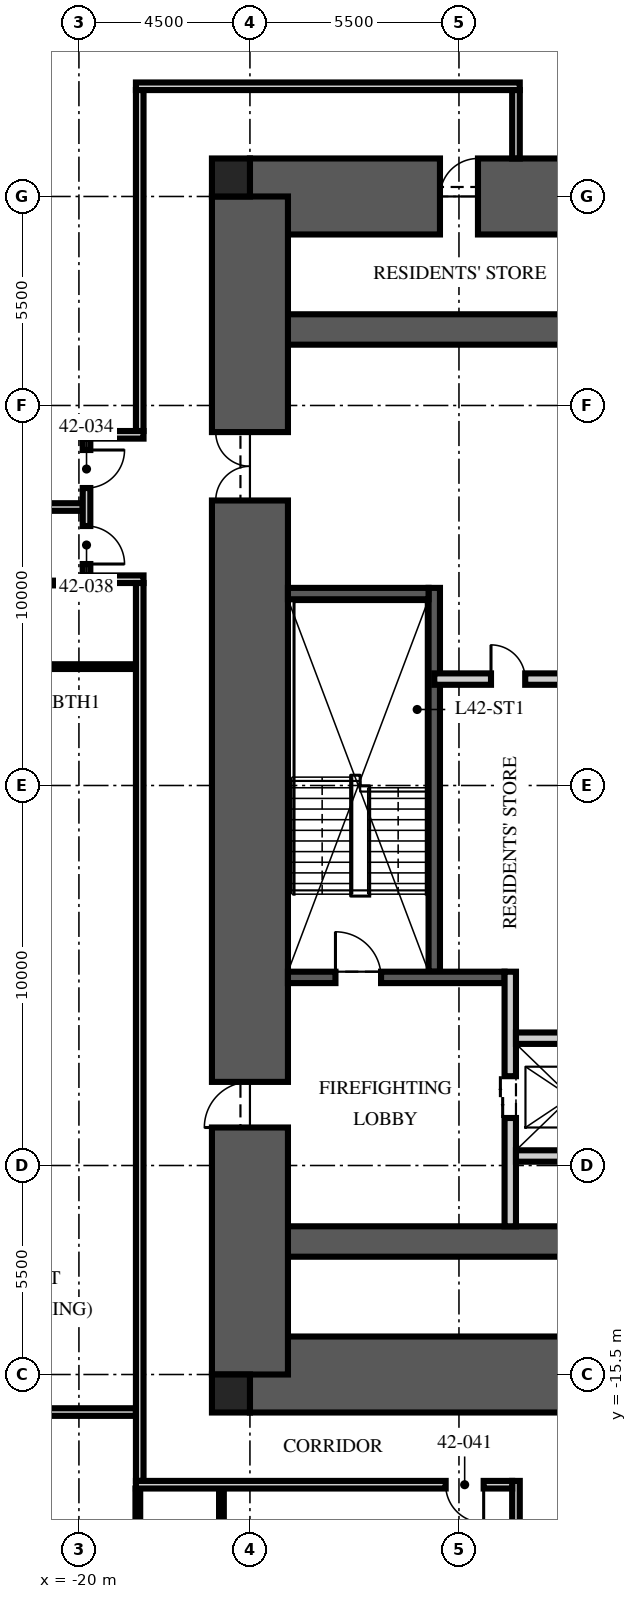
"""IFC4 building model, lengths in metres.
Left out: names, types, materials, properties, quantities, classifications, styles, units other than length and angle.
Written with IfcOpenShell. Run it as: python <this file> out.ifc"""

import sys

from ifc_helpers import new_model, si_unit, direction, frame, frame_2d, origin, origin_2d, place, context, subcontext, project, spatial, rectangle, extrude, element, fill, save


model = new_model("IFC4")
c1 = context("Model", 3, precision=1e-05, world=origin(), true_north=direction((0.0, 1.0)))
c2 = subcontext(c1, "Body", "Model", "MODEL_VIEW")
j1 = project(units=[si_unit("LENGTHUNIT", "METRE"), si_unit("PLANEANGLEUNIT", "RADIAN")], contexts=[c1])
p1 = place(None, origin())
s1 = spatial("IfcSite", under=j1, at=p1, CompositionType="ELEMENT")
p2 = place(p1, origin())
s2 = spatial("IfcBuilding", under=s1, at=p2, CompositionType="ELEMENT")
p3 = place(p2, frame((0.0, 0.0, 167.25)))
s3 = spatial("IfcBuildingStorey", under=s2, at=p3, CompositionType="ELEMENT", Elevation=167.25)
p4 = place(p3, frame((-15.5, 15.5, -0.25), z_axis=(0.0, 0.0, 1.0), x_axis=(1.0, 0.0, 0.0)))
e1 = element("IfcWall", 1, at=p4, inside=s3, PredefinedType="SHEAR", context=c2, shape_type="SweptSolid", body=[
    extrude(rectangle(XDim=31.0, YDim=2.0, at=frame_2d((15.5, 0.0))), origin(), (0.0, 0.0, 1.0), 3.75),
])
p5 = place(p4, frame((5.0, 0.0, 0.25)))
e2 = element("IfcOpeningElement", 2, at=p5, cuts=e1, PredefinedType="OPENING", context=c2, shape_type="SweptSolid", body=[
    extrude(rectangle(XDim=1.0, YDim=2.1, at=frame_2d((0.5, 1.05))), frame((0.0, 1.01, 0.0), z_axis=(0.0, -1.0, 0.0), x_axis=(1.0, 0.0, 0.0)), (0.0, 0.0, 1.0), 2.02),
])
p6 = place(p3, frame((-15.5, -15.5, -0.25), z_axis=(0.0, 0.0, 1.0), x_axis=(1.0, 0.0, 0.0)))
e3 = element("IfcWall", 3, at=p6, inside=s3, PredefinedType="SHEAR", context=c2, shape_type="SweptSolid", body=[
    extrude(rectangle(XDim=31.0, YDim=2.0, at=frame_2d((15.5, 0.0))), origin(), (0.0, 0.0, 1.0), 3.75),
])
p7 = place(p6, frame((10.4, 0.0, 0.25)))
e4 = element("IfcOpeningElement", 4, at=p7, cuts=e3, PredefinedType="OPENING", context=c2, shape_type="SweptSolid", body=[
    extrude(rectangle(XDim=1.1, YDim=2.1, at=frame_2d((0.55, 1.05))), frame((0.0, 1.01, 0.0), z_axis=(0.0, -1.0, 0.0), x_axis=(1.0, 0.0, 0.0)), (0.0, 0.0, 1.0), 2.02),
])
p8 = place(p6, frame((13.5, 0.0, 0.25)))
e5 = element("IfcOpeningElement", 5, at=p8, cuts=e3, PredefinedType="OPENING", context=c2, shape_type="SweptSolid", body=[
    extrude(rectangle(XDim=1.1, YDim=2.1, at=frame_2d((0.55, 1.05))), frame((0.0, 1.01, 0.0), z_axis=(0.0, -1.0, 0.0), x_axis=(1.0, 0.0, 0.0)), (0.0, 0.0, 1.0), 2.02),
])
p9 = place(p6, frame((16.6, 0.0, 0.25)))
e6 = element("IfcOpeningElement", 6, at=p9, cuts=e3, PredefinedType="OPENING", context=c2, shape_type="SweptSolid", body=[
    extrude(rectangle(XDim=1.1, YDim=2.1, at=frame_2d((0.55, 1.05))), frame((0.0, 1.01, 0.0), z_axis=(0.0, -1.0, 0.0), x_axis=(1.0, 0.0, 0.0)), (0.0, 0.0, 1.0), 2.02),
])
for number, where, z_axis, x_axis in (
    (7, (-15.5, 12.0, -0.25), (0.0, 0.0, 1.0), (1.0, 0.0, 0.0)),
    (8, (-15.5, -12.0, -0.25), (0.0, 0.0, 1.0), (1.0, 0.0, 0.0)),
):
    element("IfcWall", number, at=place(p3, frame(where, z_axis=z_axis, x_axis=x_axis)), inside=s3, PredefinedType="SHEAR", context=c2, shape_type="SweptSolid", body=[
        extrude(rectangle(XDim=31.0, YDim=0.8, at=frame_2d((15.5, 0.0))), origin(), (0.0, 0.0, 1.0), 3.75),
    ])
p10 = place(p3, frame((-15.5, -15.5, -0.25), z_axis=(0.0, 0.0, 1.0), x_axis=(0.0, 1.0, 0.0)))
e9 = element("IfcWall", 9, at=p10, inside=s3, PredefinedType="SHEAR", context=c2, shape_type="SweptSolid", body=[
    extrude(rectangle(XDim=31.0, YDim=2.0, at=frame_2d((15.5, 0.0))), origin(), (0.0, 0.0, 1.0), 3.75),
])
p11 = place(p10, frame((6.5, 0.0, 0.25)))
e10 = element("IfcOpeningElement", 10, at=p11, cuts=e9, PredefinedType="OPENING", context=c2, shape_type="SweptSolid", body=[
    extrude(rectangle(XDim=1.2, YDim=2.1, at=frame_2d((0.6, 1.05))), frame((0.0, 1.01, 0.0), z_axis=(0.0, -1.0, 0.0), x_axis=(1.0, 0.0, 0.0)), (0.0, 0.0, 1.0), 2.02),
])
p12 = place(p10, frame((23.0, 0.0, 0.25)))
e11 = element("IfcOpeningElement", 11, at=p12, cuts=e9, PredefinedType="OPENING", context=c2, shape_type="SweptSolid", body=[
    extrude(rectangle(XDim=1.8, YDim=2.1, at=frame_2d((0.9, 1.05))), frame((0.0, 1.01, 0.0), z_axis=(0.0, -1.0, 0.0), x_axis=(1.0, 0.0, 0.0)), (0.0, 0.0, 1.0), 2.02),
])
for number, where, z_axis, x_axis in (
    (12, (-16.0, 16.0, -0.25), (0.0, 0.0, 1.0), (1.0, 0.0, 0.0)),
    (13, (-16.0, -16.0, -0.25), (0.0, 0.0, 1.0), (1.0, 0.0, 0.0)),
):
    element("IfcColumn", number, at=place(p3, frame(where, z_axis=z_axis, x_axis=x_axis)), inside=s3, PredefinedType="COLUMN", context=c2, shape_type="SweptSolid", body=[
        extrude(rectangle(XDim=1.0, YDim=1.0, at=origin_2d()), origin(), (0.0, 0.0, 1.0), 3.75),
    ])
p13 = place(p3, frame((-10.65, -4.9, 0.0), z_axis=(0.0, 0.0, 1.0), x_axis=(0.0, 1.0, 0.0)))
e14 = element("IfcWall", 14, at=p13, inside=s3, PredefinedType="SOLIDWALL", context=c2, shape_type="SweptSolid", body=[
    extrude(rectangle(XDim=10.1, YDim=0.3, at=frame_2d((5.05, 0.0))), origin(), (0.0, 0.0, 1.0), 3.5),
])
p14 = place(p3, frame((-14.5, -5.05, 0.0), z_axis=(0.0, 0.0, 1.0), x_axis=(1.0, 0.0, 0.0)))
e15 = element("IfcWall", 15, at=p14, inside=s3, PredefinedType="SOLIDWALL", context=c2, shape_type="SweptSolid", body=[
    extrude(rectangle(XDim=5.7, YDim=0.3, at=frame_2d((2.85, 0.0))), origin(), (0.0, 0.0, 1.0), 3.5),
])
p15 = place(p14, frame((1.25, 0.0, 0.0)))
e16 = element("IfcOpeningElement", 16, at=p15, cuts=e15, PredefinedType="OPENING", context=c2, shape_type="SweptSolid", body=[
    extrude(rectangle(XDim=1.2, YDim=2.1, at=frame_2d((0.6, 1.05))), frame((0.0, 0.16, 0.0), z_axis=(0.0, -1.0, 0.0), x_axis=(1.0, 0.0, 0.0)), (0.0, 0.0, 1.0), 0.32),
])
p16 = place(p3, frame((-14.5, 5.05, 0.0), z_axis=(0.0, 0.0, 1.0), x_axis=(1.0, 0.0, 0.0)))
e17 = element("IfcWall", 17, at=p16, inside=s3, PredefinedType="SOLIDWALL", context=c2, shape_type="SweptSolid", body=[
    extrude(rectangle(XDim=3.7, YDim=0.3, at=frame_2d((1.85, 0.0))), origin(), (0.0, 0.0, 1.0), 3.5),
])
p17 = place(p3, frame((-8.65, -11.6, 0.0), z_axis=(0.0, 0.0, 1.0), x_axis=(0.0, 1.0, 0.0)))
e18 = element("IfcWall", 18, at=p17, inside=s3, PredefinedType="PARTITIONING", context=c2, shape_type="SweptSolid", body=[
    extrude(rectangle(XDim=6.7, YDim=0.3, at=frame_2d((3.35, 0.0))), origin(), (0.0, 0.0, 1.0), 3.5),
])
p18 = place(p17, frame((2.85, 0.0, 0.0)))
e19 = element("IfcOpeningElement", 19, at=p18, cuts=e18, PredefinedType="OPENING", context=c2, shape_type="SweptSolid", body=[
    extrude(rectangle(XDim=1.1, YDim=2.1, at=frame_2d((0.55, 1.05))), frame((0.0, 0.16, 0.0), z_axis=(0.0, -1.0, 0.0), x_axis=(1.0, 0.0, 0.0)), (0.0, 0.0, 1.0), 0.32),
])
p19 = place(p3, frame((-8.5, -6.65, 0.0), z_axis=(0.0, 0.0, 1.0), x_axis=(1.0, 0.0, 0.0)))
e20 = element("IfcWall", 20, at=p19, inside=s3, PredefinedType="PARTITIONING", context=c2, shape_type="SweptSolid", body=[
    extrude(rectangle(XDim=17.0, YDim=0.3, at=frame_2d((8.5, 0.0))), origin(), (0.0, 0.0, 1.0), 3.5),
])
p20 = place(p19, frame((7.8, 0.0, 0.0)))
e21 = element("IfcOpeningElement", 21, at=p20, cuts=e20, PredefinedType="OPENING", context=c2, shape_type="SweptSolid", body=[
    extrude(rectangle(XDim=1.3, YDim=2.4, at=frame_2d((0.65, 1.2))), frame((0.0, 0.16, 0.0), z_axis=(0.0, -1.0, 0.0), x_axis=(1.0, 0.0, 0.0)), (0.0, 0.0, 1.0), 0.32),
])
p21 = place(p19, frame((5.65, 0.0, 0.0)))
e22 = element("IfcOpeningElement", 22, at=p21, cuts=e20, PredefinedType="OPENING", context=c2, shape_type="SweptSolid", body=[
    extrude(rectangle(XDim=0.9, YDim=2.1, at=frame_2d((0.45, 1.05))), frame((0.0, 0.16, 0.0), z_axis=(0.0, -1.0, 0.0), x_axis=(1.0, 0.0, 0.0)), (0.0, 0.0, 1.0), 0.32),
])
p22 = place(p19, frame((10.4, 0.0, 0.0)))
e23 = element("IfcOpeningElement", 23, at=p22, cuts=e20, PredefinedType="OPENING", context=c2, shape_type="SweptSolid", body=[
    extrude(rectangle(XDim=0.9, YDim=2.1, at=frame_2d((0.45, 1.05))), frame((0.0, 0.16, 0.0), z_axis=(0.0, -1.0, 0.0), x_axis=(1.0, 0.0, 0.0)), (0.0, 0.0, 1.0), 0.32),
])
p23 = place(p3, frame((-8.5, -9.75, 0.0), z_axis=(0.0, 0.0, 1.0), x_axis=(1.0, 0.0, 0.0)))
e24 = element("IfcWall", 24, at=p23, inside=s3, PredefinedType="PARTITIONING", context=c2, shape_type="SweptSolid", body=[
    extrude(rectangle(XDim=2.9, YDim=0.3, at=frame_2d((1.45, 0.0))), origin(), (0.0, 0.0, 1.0), 3.5),
])
p24 = place(p3, frame((-10.65, 2.8, 0.0), z_axis=(0.0, 0.0, 1.0), x_axis=(1.0, 0.0, 0.0)))
e25 = element("IfcWall", 25, at=p24, inside=s3, PredefinedType="PARTITIONING", context=c2, shape_type="SweptSolid", body=[
    extrude(rectangle(XDim=21.3, YDim=0.3, at=frame_2d((10.65, 0.0))), origin(), (0.0, 0.0, 1.0), 3.5),
])
p25 = place(p24, frame((10.05, 0.0, 0.0)))
e26 = element("IfcOpeningElement", 26, at=p25, cuts=e25, PredefinedType="OPENING", context=c2, shape_type="SweptSolid", body=[
    extrude(rectangle(XDim=1.2, YDim=2.1, at=frame_2d((0.6, 1.05))), frame((0.0, 0.16, 0.0), z_axis=(0.0, -1.0, 0.0), x_axis=(1.0, 0.0, 0.0)), (0.0, 0.0, 1.0), 0.32),
])
p26 = place(p24, frame((1.493, 0.0, 0.0)))
e27 = element("IfcOpeningElement", 27, at=p26, cuts=e25, PredefinedType="OPENING", context=c2, shape_type="SweptSolid", body=[
    extrude(rectangle(XDim=0.9, YDim=2.1, at=frame_2d((0.45, 1.05))), frame((0.0, 0.16, 0.0), z_axis=(0.0, -1.0, 0.0), x_axis=(1.0, 0.0, 0.0)), (0.0, 0.0, 1.0), 0.32),
])
p27 = place(p24, frame((18.836, 0.0, 0.0)))
e28 = element("IfcOpeningElement", 28, at=p27, cuts=e25, PredefinedType="OPENING", context=c2, shape_type="SweptSolid", body=[
    extrude(rectangle(XDim=0.9, YDim=2.1, at=frame_2d((0.45, 1.05))), frame((0.0, 0.16, 0.0), z_axis=(0.0, -1.0, 0.0), x_axis=(1.0, 0.0, 0.0)), (0.0, 0.0, 1.0), 0.32),
])
p28 = place(p3, frame((-18.5, 18.4, 0.0), z_axis=(0.0, 0.0, 1.0), x_axis=(1.0, 0.0, 0.0)))
e29 = element("IfcWall", 29, at=p28, inside=s3, PredefinedType="PARTITIONING", context=c2, shape_type="SweptSolid", body=[
    extrude(rectangle(XDim=10.1, YDim=0.2, at=frame_2d((5.05, 0.0))), origin(), (0.0, 0.0, 1.0), 2.3),
])
p29 = place(p3, frame((-8.5, 18.3, 0.0), z_axis=(0.0, 0.0, 1.0), x_axis=(0.0, -1.0, 0.0)))
e30 = element("IfcWall", 30, at=p29, inside=s3, PredefinedType="PARTITIONING", context=c2, shape_type="SweptSolid", body=[
    extrude(rectangle(XDim=1.8, YDim=0.2, at=frame_2d((0.9, 0.0))), origin(), (0.0, 0.0, 1.0), 3.5),
])
p30 = place(p3, frame((-19.9, 7.328, 0.0), z_axis=(0.0, 0.0, 1.0), x_axis=(-1.0, 0.0, 0.0)))
e31 = element("IfcWall", 31, at=p30, inside=s3, PredefinedType="PARTITIONING", context=c2, shape_type="SweptSolid", body=[
    extrude(rectangle(XDim=8.5, YDim=0.2, at=frame_2d((4.25, 0.0))), origin(), (0.0, 0.0, 1.0), 2.81),
])
p31 = place(p3, frame((-18.5, -16.488, 0.0), z_axis=(0.0, 0.0, 1.0), x_axis=(-1.0, 0.0, 0.0)))
e32 = element("IfcWall", 32, at=p31, inside=s3, PredefinedType="PARTITIONING", context=c2, shape_type="SweptSolid", body=[
    extrude(rectangle(XDim=9.9, YDim=0.2, at=frame_2d((4.95, 0.0))), origin(), (0.0, 0.0, 1.0), 2.81),
])
p32 = place(p3, frame((-19.97, 5.328, 0.0), z_axis=(0.0, 0.0, 1.0), x_axis=(-1.0, 0.0, 0.0)))
e33 = element("IfcWall", 33, at=p32, inside=s3, PredefinedType="PARTITIONING", context=c2, shape_type="SweptSolid", body=[
    extrude(rectangle(XDim=2.73, YDim=0.125, at=frame_2d((1.365, 0.0))), origin(), (0.0, 0.0, 1.0), 3.5),
])
p33 = place(p3, frame((-18.5, 3.128, 0.0), z_axis=(0.0, 0.0, 1.0), x_axis=(-1.0, 0.0, 0.0)))
e34 = element("IfcWall", 34, at=p33, inside=s3, PredefinedType="PARTITIONING", context=c2, shape_type="SweptSolid", body=[
    extrude(rectangle(XDim=4.2, YDim=0.125, at=frame_2d((2.1, 0.0))), origin(), (0.0, 0.0, 1.0), 3.5),
])
p34 = place(p3, frame((-18.45, -18.5, 0.0), z_axis=(0.0, 0.0, 1.0), x_axis=(0.0, -1.0, 0.0)))
e35 = element("IfcWall", 35, at=p34, inside=s3, PredefinedType="PARTITIONING", context=c2, shape_type="SweptSolid", body=[
    extrude(rectangle(XDim=4.2, YDim=0.125, at=frame_2d((2.1, 0.0))), origin(), (0.0, 0.0, 1.0), 2.3),
])
p35 = place(p3, frame((-16.25, -18.5, 0.0), z_axis=(0.0, 0.0, 1.0), x_axis=(0.0, -1.0, 0.0)))
e36 = element("IfcWall", 36, at=p35, inside=s3, PredefinedType="PARTITIONING", context=c2, shape_type="SweptSolid", body=[
    extrude(rectangle(XDim=4.2, YDim=0.125, at=frame_2d((2.1, 0.0))), origin(), (0.0, 0.0, 1.0), 3.5),
])
p36 = place(p3, frame((-18.4, 18.3, 0.0), z_axis=(0.0, 0.0, 1.0), x_axis=(0.0, -1.0, 0.0)))
e37 = element("IfcWall", 37, at=p36, inside=s3, PredefinedType="PARTITIONING", context=c2, shape_type="SweptSolid", body=[
    extrude(rectangle(XDim=8.972, YDim=0.2, at=frame_2d((4.486, 0.0))), origin(), (0.0, 0.0, 1.0), 2.3),
])
p37 = place(p3, frame((-18.3, 9.228, 0.0), z_axis=(0.0, 0.0, 1.0), x_axis=(-1.0, 0.0, 0.0)))
e38 = element("IfcWall", 38, at=p37, inside=s3, PredefinedType="PARTITIONING", context=c2, shape_type="SweptSolid", body=[
    extrude(rectangle(XDim=1.6, YDim=0.2, at=frame_2d((0.8, 0.0))), origin(), (0.0, 0.0, 1.0), 2.7),
])
p38 = place(p3, frame((-18.3, 5.428, 0.0), z_axis=(0.0, 0.0, 1.0), x_axis=(-1.0, 0.0, 0.0)))
e39 = element("IfcWall", 39, at=p38, inside=s3, PredefinedType="PARTITIONING", context=c2, shape_type="SweptSolid", body=[
    extrude(rectangle(XDim=1.6, YDim=0.2, at=frame_2d((0.8, 0.0))), origin(), (0.0, 0.0, 1.0), 3.5),
])
p39 = place(p3, frame((-19.8, 9.128, 0.0), z_axis=(0.0, 0.0, 1.0), x_axis=(0.0, -1.0, 0.0)))
e40 = element("IfcWall", 40, at=p39, inside=s3, PredefinedType="PARTITIONING", context=c2, shape_type="SweptSolid", body=[
    extrude(rectangle(XDim=3.6, YDim=0.2, at=frame_2d((1.8, 0.0))), origin(), (0.0, 0.0, 1.0), 2.7),
])
p40 = place(p39, frame((0.3, 0.0, 0.0)))
e41 = element("IfcOpeningElement", 41, at=p40, cuts=e40, PredefinedType="OPENING", context=c2, shape_type="SweptSolid", body=[
    extrude(rectangle(XDim=1.0, YDim=2.2, at=frame_2d((0.5, 1.1))), frame((0.0, 0.11, 0.0), z_axis=(0.0, -1.0, 0.0), x_axis=(1.0, 0.0, 0.0)), (0.0, 0.0, 1.0), 0.22),
])
p41 = place(p39, frame((2.3, 0.0, 0.0)))
e42 = element("IfcOpeningElement", 42, at=p41, cuts=e40, PredefinedType="OPENING", context=c2, shape_type="SweptSolid", body=[
    extrude(rectangle(XDim=1.0, YDim=2.2, at=frame_2d((0.5, 1.1))), frame((0.0, 0.11, 0.0), z_axis=(0.0, -1.0, 0.0), x_axis=(1.0, 0.0, 0.0)), (0.0, 0.0, 1.0), 0.22),
])
p42 = place(p3, frame((-18.4, 5.328, 0.0), z_axis=(0.0, 0.0, 1.0), x_axis=(0.0, -1.0, 0.0)))
e43 = element("IfcWall", 43, at=p42, inside=s3, PredefinedType="PARTITIONING", context=c2, shape_type="SweptSolid", body=[
    extrude(rectangle(XDim=23.628, YDim=0.2, at=frame_2d((11.814, 0.0))), origin(), (0.0, 0.0, 1.0), 2.3),
])
p43 = place(p3, frame((-8.5, -18.3, 0.0), z_axis=(0.0, 0.0, 1.0), x_axis=(0.0, -1.0, 0.0)))
e44 = element("IfcWall", 44, at=p43, inside=s3, PredefinedType="PARTITIONING", context=c2, shape_type="SweptSolid", body=[
    extrude(rectangle(XDim=3.0, YDim=0.2, at=frame_2d((1.5, 0.0))), origin(), (0.0, 0.0, 1.0), 3.5),
])
p44 = place(p3, frame((-8.6, -18.4, 0.0), z_axis=(0.0, 0.0, 1.0), x_axis=(-1.0, 0.0, 0.0)))
e45 = element("IfcWall", 45, at=p44, inside=s3, PredefinedType="PARTITIONING", context=c2, shape_type="SweptSolid", body=[
    extrude(rectangle(XDim=9.9, YDim=0.2, at=frame_2d((4.95, 0.0))), origin(), (0.0, 0.0, 1.0), 2.3),
])
p45 = place(p44, frame((0.75, 0.0, 0.0)))
e46 = element("IfcOpeningElement", 46, at=p45, cuts=e45, PredefinedType="OPENING", context=c2, shape_type="SweptSolid", body=[
    extrude(rectangle(XDim=1.0, YDim=2.2, at=frame_2d((0.5, 1.1))), frame((0.0, 0.11, 0.0), z_axis=(0.0, -1.0, 0.0), x_axis=(1.0, 0.0, 0.0)), (0.0, 0.0, 1.0), 0.22),
])
p46 = place(p15, origin())
e47 = element("IfcDoor", 47, at=p46, inside=s3, OperationType="SINGLE_SWING_LEFT", PredefinedType="DOOR", context=c2, shape_type="SweptSolid", body=[
    extrude(rectangle(XDim=1.2, YDim=2.1, at=frame_2d((0.6, 1.05))), frame((0.0, 0.025, 0.0), z_axis=(0.0, -1.0, 0.0), x_axis=(1.0, 0.0, 0.0)), (0.0, 0.0, 1.0), 0.05),
])
fill(e16, e47)
p47 = place(p11, origin())
e48 = element("IfcDoor", 48, at=p47, inside=s3, OperationType="SINGLE_SWING_LEFT", PredefinedType="DOOR", context=c2, shape_type="SweptSolid", body=[
    extrude(rectangle(XDim=1.2, YDim=2.1, at=frame_2d((0.6, 1.05))), frame((0.0, 0.025, 0.0), z_axis=(0.0, -1.0, 0.0), x_axis=(1.0, 0.0, 0.0)), (0.0, 0.0, 1.0), 0.05),
])
fill(e10, e48)
p48 = place(p12, origin())
e49 = element("IfcDoor", 49, at=p48, inside=s3, OperationType="DOUBLE_DOOR_SINGLE_SWING", PredefinedType="DOOR", context=c2, shape_type="SweptSolid", body=[
    extrude(rectangle(XDim=1.8, YDim=2.1, at=frame_2d((0.9, 1.05))), frame((0.0, 0.025, 0.0), z_axis=(0.0, -1.0, 0.0), x_axis=(1.0, 0.0, 0.0)), (0.0, 0.0, 1.0), 0.05),
])
fill(e11, e49)
p49 = place(p18, origin())
e50 = element("IfcDoor", 50, at=p49, inside=s3, OperationType="DOUBLE_DOOR_SLIDING", PredefinedType="DOOR", context=c2, shape_type="SweptSolid", body=[
    extrude(rectangle(XDim=1.1, YDim=2.1, at=frame_2d((0.55, 1.05))), frame((0.0, 0.025, 0.0), z_axis=(0.0, -1.0, 0.0), x_axis=(1.0, 0.0, 0.0)), (0.0, 0.0, 1.0), 0.05),
])
fill(e19, e50)
p50 = place(p26, origin())
e51 = element("IfcDoor", 51, at=p50, inside=s3, OperationType="SINGLE_SWING_LEFT", PredefinedType="DOOR", context=c2, shape_type="SweptSolid", body=[
    extrude(rectangle(XDim=0.9, YDim=2.1, at=frame_2d((0.45, 1.05))), frame((0.0, 0.025, 0.0), z_axis=(0.0, -1.0, 0.0), x_axis=(1.0, 0.0, 0.0)), (0.0, 0.0, 1.0), 0.05),
])
fill(e27, e51)
p51 = place(p5, origin())
e52 = element("IfcDoor", 52, at=p51, inside=s3, OperationType="SINGLE_SWING_RIGHT", PredefinedType="DOOR", context=c2, shape_type="SweptSolid", body=[
    extrude(rectangle(XDim=1.0, YDim=2.1, at=frame_2d((0.5, 1.05))), frame((0.0, 0.025, 0.0), z_axis=(0.0, -1.0, 0.0), x_axis=(1.0, 0.0, 0.0)), (0.0, 0.0, 1.0), 0.05),
])
fill(e2, e52)
p52 = place(p40, origin())
e53 = element("IfcDoor", 53, at=p52, inside=s3, OperationType="SINGLE_SWING_LEFT", PredefinedType="DOOR", context=c2, shape_type="SweptSolid", body=[
    extrude(rectangle(XDim=1.0, YDim=2.2, at=frame_2d((0.5, 1.1))), frame((0.0, 0.025, 0.0), z_axis=(0.0, -1.0, 0.0), x_axis=(1.0, 0.0, 0.0)), (0.0, 0.0, 1.0), 0.05),
])
fill(e41, e53)
p53 = place(p41, origin())
e54 = element("IfcDoor", 54, at=p53, inside=s3, OperationType="SINGLE_SWING_RIGHT", PredefinedType="DOOR", context=c2, shape_type="SweptSolid", body=[
    extrude(rectangle(XDim=1.0, YDim=2.2, at=frame_2d((0.5, 1.1))), frame((0.0, 0.025, 0.0), z_axis=(0.0, -1.0, 0.0), x_axis=(1.0, 0.0, 0.0)), (0.0, 0.0, 1.0), 0.05),
])
fill(e42, e54)
p54 = place(p45, origin())
e55 = element("IfcDoor", 55, at=p54, inside=s3, OperationType="SINGLE_SWING_LEFT", PredefinedType="DOOR", context=c2, shape_type="SweptSolid", body=[
    extrude(rectangle(XDim=1.0, YDim=2.2, at=frame_2d((0.5, 1.1))), frame((0.0, 0.025, 0.0), z_axis=(0.0, -1.0, 0.0), x_axis=(1.0, 0.0, 0.0)), (0.0, 0.0, 1.0), 0.05),
])
fill(e46, e55)
save(model, sys.argv[1])
